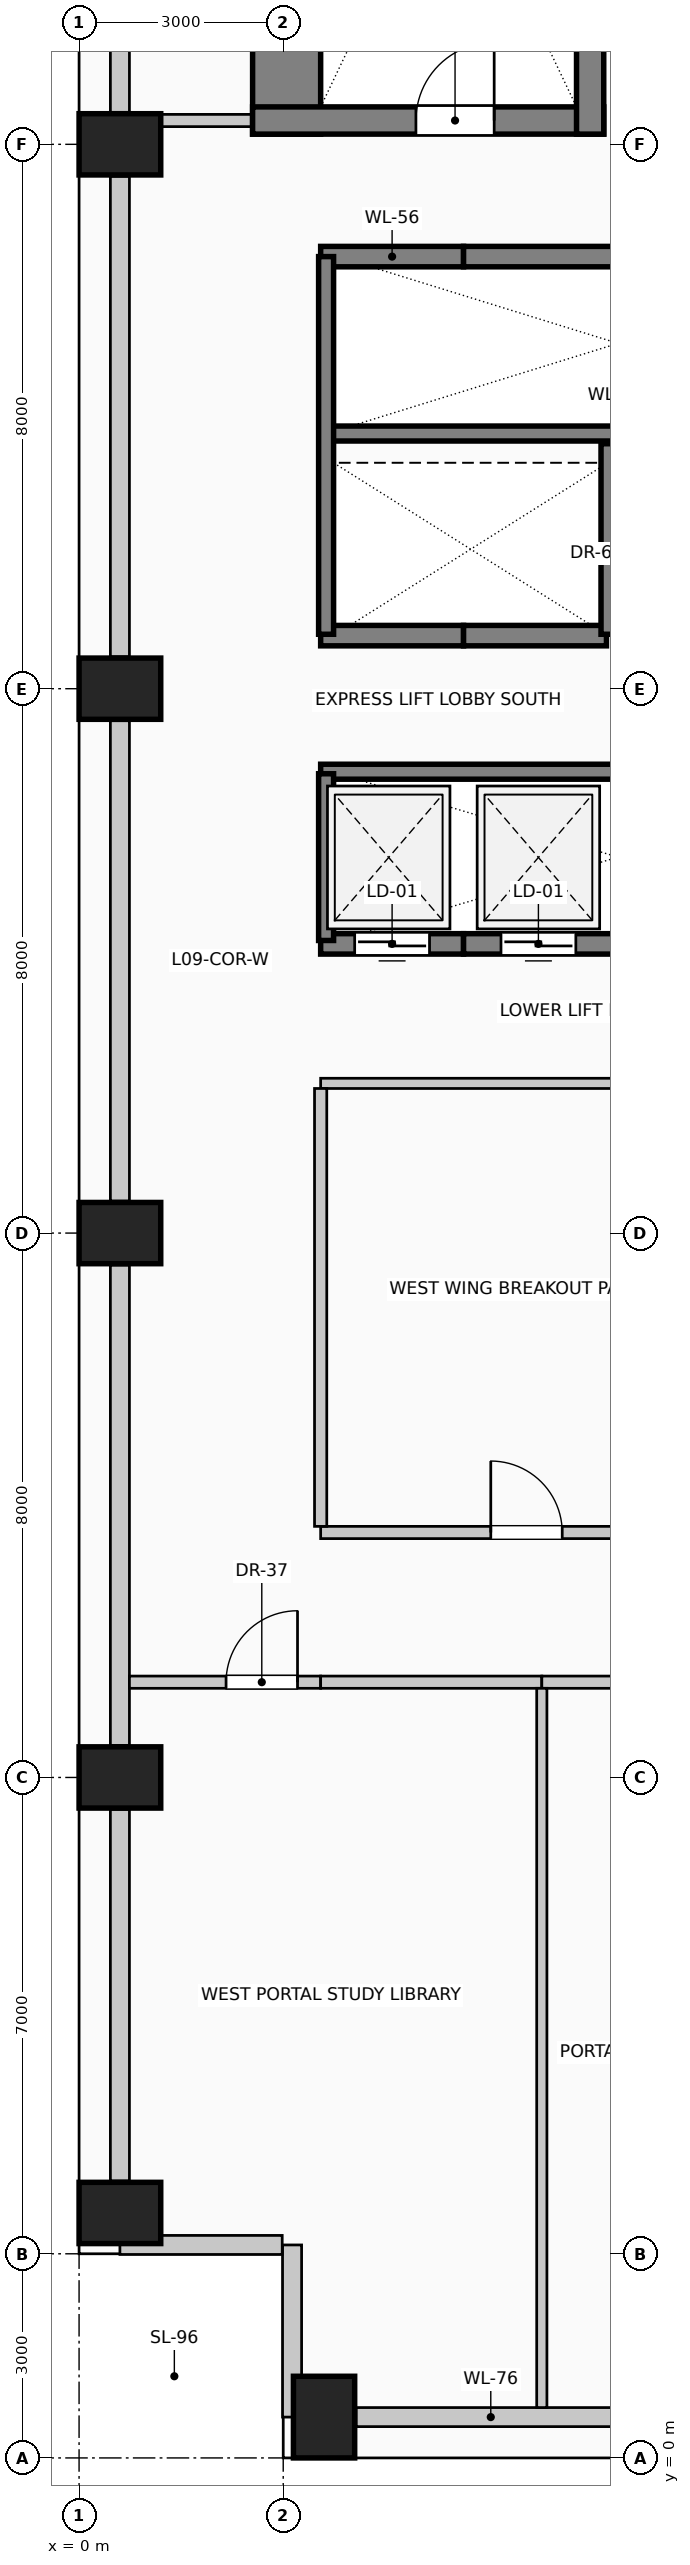
"""IFC4 building model, lengths in metres.
Left out: names, types, materials, properties, quantities, classifications, styles, units other than length and angle.
Written with IfcOpenShell. Run it as: python <this file> out.ifc"""

import sys

from ifc_helpers import new_model, si_unit, direction, frame, frame_2d, origin, origin_2d, place, context, subcontext, project, spatial, rectangle, extrude, element, fill, save


model = new_model("IFC4")
c1 = context("Model", 3, precision=1e-05, world=origin(), true_north=direction((0.0, 1.0)))
c2 = subcontext(c1, "Body", "Model", "MODEL_VIEW")
j1 = project(units=[si_unit("LENGTHUNIT", "METRE"), si_unit("PLANEANGLEUNIT", "RADIAN")], contexts=[c1])
p1 = place(None, origin())
s1 = spatial("IfcSite", under=j1, at=p1, CompositionType="ELEMENT")
p2 = place(p1, origin())
s2 = spatial("IfcBuilding", under=s1, at=p2, CompositionType="ELEMENT")
p3 = place(p2, frame((0.0, 0.0, 38.6)))
s3 = spatial("IfcBuildingStorey", under=s2, at=p3, CompositionType="ELEMENT", Elevation=38.6)
p4 = place(p3, frame((3.05, 34.15, 0.0), z_axis=(0.0, 0.0, 1.0), x_axis=(0.0, 1.0, 0.0)))
e1 = element("IfcWall", 1, at=p4, inside=s3, PredefinedType="SHEAR", context=c2, shape_type="SweptSolid", body=[
    extrude(rectangle(XDim=9.28, YDim=1.0, at=frame_2d((4.64, 0.0))), origin(), (0.0, 0.0, 1.0), 4.0),
])
p5 = place(p3, frame((2.55, 34.35, 0.0), z_axis=(0.0, 0.0, 1.0), x_axis=(1.0, 0.0, 0.0)))
e2 = element("IfcWall", 2, at=p5, inside=s3, PredefinedType="SHEAR", context=c2, shape_type="SweptSolid", body=[
    extrude(rectangle(XDim=5.16, YDim=0.4, at=frame_2d((2.58, 0.0))), origin(), (0.0, 0.0, 1.0), 4.0),
])
p6 = place(p5, frame((2.4, 0.0, 0.0)))
e3 = element("IfcOpeningElement", 3, at=p6, cuts=e2, PredefinedType="OPENING", context=c2, shape_type="SweptSolid", body=[
    extrude(rectangle(XDim=1.15, YDim=2.2, at=frame_2d((0.575, 1.1))), frame((0.0, 0.21, 0.0), z_axis=(0.0, -1.0, 0.0), x_axis=(1.0, 0.0, 0.0)), (0.0, 0.0, 1.0), 0.42),
])
p7 = place(p3, frame((7.51, 34.15, 0.0), z_axis=(0.0, 0.0, 1.0), x_axis=(0.0, 1.0, 0.0)))
e4 = element("IfcWall", 4, at=p7, inside=s3, PredefinedType="SHEAR", context=c2, shape_type="SweptSolid", body=[
    extrude(rectangle(XDim=9.28, YDim=0.4, at=frame_2d((4.64, 0.0))), origin(), (0.0, 0.0, 1.0), 4.0),
])
for number, where, z_axis, x_axis in (
    (5, (3.6, 0.6, 0.0), (0.0, 0.0, 1.0), (1.0, 0.0, 0.0)),
    (6, (0.6, 3.6, 0.0), (0.0, 0.0, 1.0), (0.0, 1.0, 0.0)),
    (7, (0.6, 10.0, 0.0), (0.0, 0.0, 1.0), (0.0, 1.0, 0.0)),
    (8, (0.6, 18.0, 0.0), (0.0, 0.0, 1.0), (0.0, 1.0, 0.0)),
    (9, (0.6, 26.0, 0.0), (0.0, 0.0, 1.0), (0.0, 1.0, 0.0)),
    (10, (0.6, 34.0, 0.0), (0.0, 0.0, 1.0), (0.0, 1.0, 0.0)),
):
    element("IfcColumn", number, at=place(p3, frame(where, z_axis=z_axis, x_axis=x_axis)), inside=s3, PredefinedType="COLUMN", context=c2, shape_type="SweptSolid", body=[
        extrude(rectangle(XDim=0.9, YDim=1.2, at=origin_2d()), origin(), (0.0, 0.0, 1.0), 4.0),
    ])
p8 = place(p3, frame((8.03, 0.6, 0.0), z_axis=(0.0, 0.0, 1.0), x_axis=(-1.0, 0.0, 0.0)))
e11 = element("IfcWall", 11, at=p8, inside=s3, PredefinedType="SOLIDWALL", context=c2, shape_type="SweptSolid", body=[
    extrude(rectangle(XDim=3.96, YDim=0.28, at=frame_2d((1.98, 0.0))), origin(), (0.0, 0.0, 1.0), 2.85),
])
p9 = place(p3, frame((0.6, 4.07, 0.0), z_axis=(0.0, 0.0, 1.0), x_axis=(0.0, 1.0, 0.0)))
e12 = element("IfcWall", 12, at=p9, inside=s3, PredefinedType="SOLIDWALL", context=c2, shape_type="SweptSolid", body=[
    extrude(rectangle(XDim=5.46, YDim=0.28, at=frame_2d((2.73, 0.0))), origin(), (0.0, 0.0, 1.0), 2.85),
])
for number, where, z_axis, x_axis in (
    (13, (0.6, 10.47, 0.0), (0.0, 0.0, 1.0), (0.0, 1.0, 0.0)),
    (14, (0.6, 18.47, 0.0), (0.0, 0.0, 1.0), (0.0, 1.0, 0.0)),
    (15, (0.6, 26.47, 0.0), (0.0, 0.0, 1.0), (0.0, 1.0, 0.0)),
):
    element("IfcWall", number, at=place(p3, frame(where, z_axis=z_axis, x_axis=x_axis)), inside=s3, PredefinedType="SOLIDWALL", context=c2, shape_type="SweptSolid", body=[
        extrude(rectangle(XDim=7.06, YDim=0.28, at=frame_2d((3.53, 0.0))), origin(), (0.0, 0.0, 1.0), 2.85),
    ])
p10 = place(p3, frame((0.6, 34.47, 0.0), z_axis=(0.0, 0.0, 1.0), x_axis=(0.0, 1.0, 0.0)))
e16 = element("IfcWall", 16, at=p10, inside=s3, PredefinedType="SOLIDWALL", context=c2, shape_type="SweptSolid", body=[
    extrude(rectangle(XDim=7.46, YDim=0.28, at=frame_2d((3.73, 0.0))), origin(), (0.0, 0.0, 1.0), 2.85),
])
p11 = place(p3, frame((3.13, 0.6, 0.0), z_axis=(0.0, 0.0, 1.0), x_axis=(0.0, 1.0, 0.0)))
e17 = element("IfcWall", 17, at=p11, inside=s3, PredefinedType="SOLIDWALL", context=c2, shape_type="SweptSolid", body=[
    extrude(rectangle(XDim=2.53, YDim=0.28, at=frame_2d((1.265, 0.0))), origin(), (0.0, 0.0, 1.0), 3.7),
])
p12 = place(p3, frame((2.985, 3.13, 0.0), z_axis=(0.0, 0.0, 1.0), x_axis=(-1.0, 0.0, 0.0)))
e18 = element("IfcWall", 18, at=p12, inside=s3, PredefinedType="SOLIDWALL", context=c2, shape_type="SweptSolid", body=[
    extrude(rectangle(XDim=2.385, YDim=0.28, at=frame_2d((1.192, 0.0))), origin(), (0.0, 0.0, 1.0), 3.7),
])
p13 = place(p3, frame((5.65, 22.25, 0.0), z_axis=(0.0, 0.0, 1.0), x_axis=(-1.0, 0.0, 0.0)))
e19 = element("IfcWall", 19, at=p13, inside=s3, PredefinedType="SOLIDWALL", context=c2, shape_type="SweptSolid", body=[
    extrude(rectangle(XDim=2.1, YDim=0.3, at=frame_2d((1.05, 0.0))), origin(), (0.0, 0.0, 1.0), 4.0),
])
p14 = place(p13, frame((0.5, 0.0, 0.0)))
e20 = element("IfcOpeningElement", 20, at=p14, cuts=e19, PredefinedType="OPENING", context=c2, shape_type="SweptSolid", body=[
    extrude(rectangle(XDim=1.1, YDim=2.2, at=frame_2d((0.55, 1.1))), frame((0.0, 0.16, 0.0), z_axis=(0.0, -1.0, 0.0), x_axis=(1.0, 0.0, 0.0)), (0.0, 0.0, 1.0), 0.32),
])
p15 = place(p3, frame((7.85, 22.25, 0.0), z_axis=(0.0, 0.0, 1.0), x_axis=(-1.0, 0.0, 0.0)))
e21 = element("IfcWall", 21, at=p15, inside=s3, PredefinedType="SOLIDWALL", context=c2, shape_type="SweptSolid", body=[
    extrude(rectangle(XDim=2.2, YDim=0.3, at=frame_2d((1.1, 0.0))), origin(), (0.0, 0.0, 1.0), 4.0),
])
p16 = place(p15, frame((0.55, 0.0, 0.0)))
e22 = element("IfcOpeningElement", 22, at=p16, cuts=e21, PredefinedType="OPENING", context=c2, shape_type="SweptSolid", body=[
    extrude(rectangle(XDim=1.1, YDim=2.2, at=frame_2d((0.55, 1.1))), frame((0.0, 0.16, 0.0), z_axis=(0.0, -1.0, 0.0), x_axis=(1.0, 0.0, 0.0)), (0.0, 0.0, 1.0), 0.32),
])
p17 = place(p3, frame((3.55, 32.35, 0.0), z_axis=(0.0, 0.0, 1.0), x_axis=(1.0, 0.0, 0.0)))
e23 = element("IfcWall", 23, at=p17, inside=s3, PredefinedType="SOLIDWALL", context=c2, shape_type="SweptSolid", body=[
    extrude(rectangle(XDim=2.1, YDim=0.3, at=frame_2d((1.05, 0.0))), origin(), (0.0, 0.0, 1.0), 4.0),
])
p18 = place(p3, frame((5.65, 32.35, 0.0), z_axis=(0.0, 0.0, 1.0), x_axis=(1.0, 0.0, 0.0)))
e24 = element("IfcWall", 24, at=p18, inside=s3, PredefinedType="SOLIDWALL", context=c2, shape_type="SweptSolid", body=[
    extrude(rectangle(XDim=2.2, YDim=0.3, at=frame_2d((1.1, 0.0))), origin(), (0.0, 0.0, 1.0), 4.0),
])
p19 = place(p3, frame((5.65, 26.78, 0.0), z_axis=(0.0, 0.0, 1.0), x_axis=(-1.0, 0.0, 0.0)))
e25 = element("IfcWall", 25, at=p19, inside=s3, PredefinedType="SOLIDWALL", context=c2, shape_type="SweptSolid", body=[
    extrude(rectangle(XDim=2.1, YDim=0.3, at=frame_2d((1.05, 0.0))), origin(), (0.0, 0.0, 1.0), 4.0),
])
p20 = place(p3, frame((7.75, 26.78, 0.0), z_axis=(0.0, 0.0, 1.0), x_axis=(-1.0, 0.0, 0.0)))
e26 = element("IfcWall", 26, at=p20, inside=s3, PredefinedType="SOLIDWALL", context=c2, shape_type="SweptSolid", body=[
    extrude(rectangle(XDim=2.1, YDim=0.3, at=frame_2d((1.05, 0.0))), origin(), (0.0, 0.0, 1.0), 4.0),
])
p21 = place(p3, frame((3.55, 29.75, 0.0), z_axis=(0.0, 0.0, 1.0), x_axis=(1.0, 0.0, 0.0)))
e27 = element("IfcWall", 27, at=p21, inside=s3, PredefinedType="SOLIDWALL", context=c2, shape_type="SweptSolid", body=[
    extrude(rectangle(XDim=8.65, YDim=0.22, at=frame_2d((4.325, 0.0))), origin(), (0.0, 0.0, 1.0), 4.0),
])
p22 = place(p3, frame((3.63, 26.8, 0.0), z_axis=(0.0, 0.0, 1.0), x_axis=(0.0, 1.0, 0.0)))
e28 = element("IfcWall", 28, at=p22, inside=s3, PredefinedType="SOLIDWALL", context=c2, shape_type="SweptSolid", body=[
    extrude(rectangle(XDim=5.55, YDim=0.22, at=frame_2d((2.775, 0.0))), origin(), (0.0, 0.0, 1.0), 4.0),
])
p23 = place(p3, frame((7.78, 26.8, 0.0), z_axis=(0.0, 0.0, 1.0), x_axis=(0.0, 1.0, 0.0)))
e29 = element("IfcWall", 29, at=p23, inside=s3, PredefinedType="SOLIDWALL", context=c2, shape_type="SweptSolid", body=[
    extrude(rectangle(XDim=2.8, YDim=0.22, at=frame_2d((1.4, 0.0))), origin(), (0.0, 0.0, 1.0), 4.0),
])
p24 = place(p3, frame((3.55, 24.78, 0.0), z_axis=(0.0, 0.0, 1.0), x_axis=(1.0, 0.0, 0.0)))
e30 = element("IfcWall", 30, at=p24, inside=s3, PredefinedType="SOLIDWALL", context=c2, shape_type="SweptSolid", body=[
    extrude(rectangle(XDim=8.65, YDim=0.22, at=frame_2d((4.325, 0.0))), origin(), (0.0, 0.0, 1.0), 4.0),
])
p25 = place(p3, frame((3.63, 22.3, 0.0), z_axis=(0.0, 0.0, 1.0), x_axis=(0.0, 1.0, 0.0)))
e31 = element("IfcWall", 31, at=p25, inside=s3, PredefinedType="SOLIDWALL", context=c2, shape_type="SweptSolid", body=[
    extrude(rectangle(XDim=2.45, YDim=0.22, at=frame_2d((1.225, 0.0))), origin(), (0.0, 0.0, 1.0), 4.0),
])
p26 = place(p3, frame((0.74, 11.4, 0.0), z_axis=(0.0, 0.0, 1.0), x_axis=(1.0, 0.0, 0.0)))
e32 = element("IfcWall", 32, at=p26, inside=s3, PredefinedType="PARTITIONING", context=c2, shape_type="SweptSolid", body=[
    extrude(rectangle(XDim=2.81, YDim=0.18, at=frame_2d((1.405, 0.0))), origin(), (0.0, 0.0, 1.0), 3.095),
])
p27 = place(p26, frame((1.42, 0.0, 0.0)))
e33 = element("IfcOpeningElement", 33, at=p27, cuts=e32, PredefinedType="OPENING", context=c2, shape_type="SweptSolid", body=[
    extrude(rectangle(XDim=1.05, YDim=2.15, at=frame_2d((0.525, 1.075))), frame((0.0, 0.1, 0.0), z_axis=(0.0, -1.0, 0.0), x_axis=(1.0, 0.0, 0.0)), (0.0, 0.0, 1.0), 0.2),
])
p28 = place(p3, frame((3.55, 11.4, 0.0), z_axis=(0.0, 0.0, 1.0), x_axis=(1.0, 0.0, 0.0)))
e34 = element("IfcWall", 34, at=p28, inside=s3, PredefinedType="PARTITIONING", context=c2, shape_type="SweptSolid", body=[
    extrude(rectangle(XDim=3.25, YDim=0.18, at=frame_2d((1.625, 0.0))), origin(), (0.0, 0.0, 1.0), 3.095),
])
p29 = place(p3, frame((6.8, 11.4, 0.0), z_axis=(0.0, 0.0, 1.0), x_axis=(1.0, 0.0, 0.0)))
e35 = element("IfcWall", 35, at=p29, inside=s3, PredefinedType="PARTITIONING", context=c2, shape_type="SweptSolid", body=[
    extrude(rectangle(XDim=5.0, YDim=0.18, at=frame_2d((2.5, 0.0))), origin(), (0.0, 0.0, 1.0), 3.095),
])
p30 = place(p29, frame((1.975, 0.0, 0.0)))
e36 = element("IfcOpeningElement", 36, at=p30, cuts=e35, PredefinedType="OPENING", context=c2, shape_type="SweptSolid", body=[
    extrude(rectangle(XDim=1.05, YDim=2.15, at=frame_2d((0.525, 1.075))), frame((0.0, 0.1, 0.0), z_axis=(0.0, -1.0, 0.0), x_axis=(1.0, 0.0, 0.0)), (0.0, 0.0, 1.0), 0.2),
])
p31 = place(p3, frame((3.55, 13.6, 0.0), z_axis=(0.0, 0.0, 1.0), x_axis=(1.0, 0.0, 0.0)))
e37 = element("IfcWall", 37, at=p31, inside=s3, PredefinedType="PARTITIONING", context=c2, shape_type="SweptSolid", body=[
    extrude(rectangle(XDim=6.05, YDim=0.18, at=frame_2d((3.025, 0.0))), origin(), (0.0, 0.0, 1.0), 3.7),
])
p32 = place(p31, frame((2.5, 0.0, 0.0)))
e38 = element("IfcOpeningElement", 38, at=p32, cuts=e37, PredefinedType="OPENING", context=c2, shape_type="SweptSolid", body=[
    extrude(rectangle(XDim=1.05, YDim=2.15, at=frame_2d((0.525, 1.075))), frame((0.0, 0.1, 0.0), z_axis=(0.0, -1.0, 0.0), x_axis=(1.0, 0.0, 0.0)), (0.0, 0.0, 1.0), 0.2),
])
p33 = place(p3, frame((3.55, 20.2, 0.0), z_axis=(0.0, 0.0, 1.0), x_axis=(1.0, 0.0, 0.0)))
e39 = element("IfcWall", 39, at=p33, inside=s3, PredefinedType="PARTITIONING", context=c2, shape_type="SweptSolid", body=[
    extrude(rectangle(XDim=6.05, YDim=0.15, at=frame_2d((3.025, 0.0))), origin(), (0.0, 0.0, 1.0), 3.7),
])
p34 = place(p3, frame((1.2, 34.35, 0.0), z_axis=(0.0, 0.0, 1.0), x_axis=(1.0, 0.0, 0.0)))
e40 = element("IfcWall", 40, at=p34, inside=s3, PredefinedType="PARTITIONING", context=c2, shape_type="SweptSolid", body=[
    extrude(rectangle(XDim=1.35, YDim=0.18, at=frame_2d((0.675, 0.0))), origin(), (0.0, 0.0, 1.0), 3.7),
])
p35 = place(p3, frame((3.55, 13.69, 0.0), z_axis=(0.0, 0.0, 1.0), x_axis=(0.0, 1.0, 0.0)))
e41 = element("IfcWall", 41, at=p35, inside=s3, PredefinedType="PARTITIONING", context=c2, shape_type="SweptSolid", body=[
    extrude(rectangle(XDim=6.435, YDim=0.18, at=frame_2d((3.218, 0.0))), origin(), (0.0, 0.0, 1.0), 3.7),
])
p36 = place(p3, frame((6.8, 0.74, 0.0), z_axis=(0.0, 0.0, 1.0), x_axis=(0.0, 1.0, 0.0)))
e42 = element("IfcWall", 42, at=p36, inside=s3, PredefinedType="PARTITIONING", context=c2, shape_type="SweptSolid", body=[
    extrude(rectangle(XDim=10.57, YDim=0.15, at=frame_2d((5.285, 0.0))), origin(), (0.0, 0.0, 1.0), 3.7),
])
p37 = place(p14, origin())
e43 = element("IfcDoor", 43, at=p37, inside=s3, OperationType="SLIDING_TO_LEFT", PredefinedType="DOOR", context=c2, shape_type="SweptSolid", body=[
    extrude(rectangle(XDim=1.1, YDim=2.2, at=frame_2d((0.55, 1.1))), frame((0.0, 0.025, 0.0), z_axis=(0.0, -1.0, 0.0), x_axis=(1.0, 0.0, 0.0)), (0.0, 0.0, 1.0), 0.05),
])
fill(e20, e43)
p38 = place(p16, origin())
e44 = element("IfcDoor", 44, at=p38, inside=s3, OperationType="SLIDING_TO_RIGHT", PredefinedType="DOOR", context=c2, shape_type="SweptSolid", body=[
    extrude(rectangle(XDim=1.1, YDim=2.2, at=frame_2d((0.55, 1.1))), frame((0.0, 0.025, 0.0), z_axis=(0.0, -1.0, 0.0), x_axis=(1.0, 0.0, 0.0)), (0.0, 0.0, 1.0), 0.05),
])
fill(e22, e44)
p39 = place(p6, origin())
e45 = element("IfcDoor", 45, at=p39, inside=s3, OperationType="SINGLE_SWING_RIGHT", PredefinedType="DOOR", context=c2, shape_type="SweptSolid", body=[
    extrude(rectangle(XDim=1.15, YDim=2.2, at=frame_2d((0.575, 1.1))), frame((0.0, 0.025, 0.0), z_axis=(0.0, -1.0, 0.0), x_axis=(1.0, 0.0, 0.0)), (0.0, 0.0, 1.0), 0.05),
])
fill(e3, e45)
p40 = place(p27, origin())
e46 = element("IfcDoor", 46, at=p40, inside=s3, OperationType="SINGLE_SWING_RIGHT", PredefinedType="DOOR", context=c2, shape_type="SweptSolid", body=[
    extrude(rectangle(XDim=1.05, YDim=2.15, at=frame_2d((0.525, 1.075))), frame((0.0, 0.025, 0.0), z_axis=(0.0, -1.0, 0.0), x_axis=(1.0, 0.0, 0.0)), (0.0, 0.0, 1.0), 0.05),
])
fill(e33, e46)
p41 = place(p32, origin())
e47 = element("IfcDoor", 47, at=p41, inside=s3, OperationType="SINGLE_SWING_LEFT", PredefinedType="DOOR", context=c2, shape_type="SweptSolid", body=[
    extrude(rectangle(XDim=1.05, YDim=2.15, at=frame_2d((0.525, 1.075))), frame((0.0, 0.025, 0.0), z_axis=(0.0, -1.0, 0.0), x_axis=(1.0, 0.0, 0.0)), (0.0, 0.0, 1.0), 0.05),
])
fill(e38, e47)
save(model, sys.argv[1])
